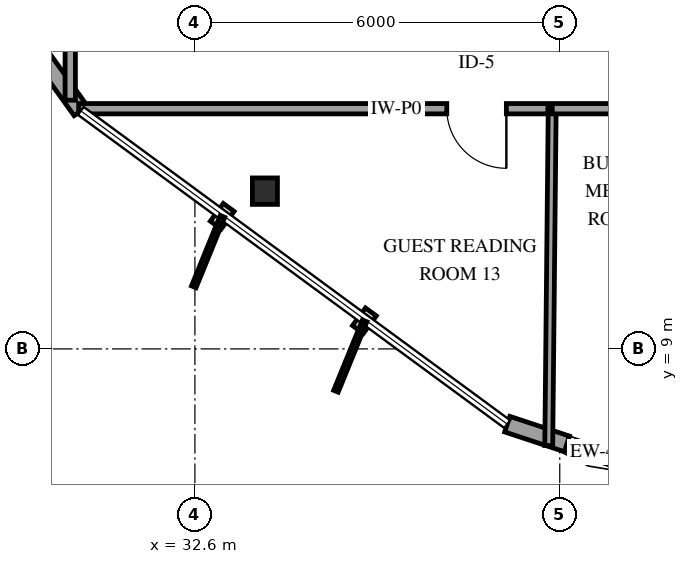
"""IFC4 building model, lengths in metres.
Left out: names, types, materials, properties, quantities, classifications, styles, units other than length and angle.
Written with IfcOpenShell. Run it as: python <this file> out.ifc"""

import sys

from ifc_helpers import new_model, si_unit, direction, frame, frame_2d, origin, origin_2d, place, context, subcontext, project, spatial, rectangle, i_section, extrude, element, fill, save


model = new_model("IFC4")
c1 = context("Model", 3, precision=1e-05, world=origin(), true_north=direction((0.0, 1.0)))
c2 = subcontext(c1, "Body", "Model", "MODEL_VIEW")
j1 = project(units=[si_unit("LENGTHUNIT", "METRE"), si_unit("PLANEANGLEUNIT", "RADIAN")], contexts=[c1])
p1 = place(None, origin())
s1 = spatial("IfcSite", under=j1, at=p1, CompositionType="ELEMENT")
p2 = place(p1, origin())
s2 = spatial("IfcBuilding", under=s1, at=p2, CompositionType="ELEMENT")
p3 = place(p2, frame((0.0, 0.0, 164.2)))
s3 = spatial("IfcBuildingStorey", under=s2, at=p3, CompositionType="ELEMENT", Elevation=164.2)
p4 = place(p3, frame((33.751, 11.594, 0.0), z_axis=(0.0, 0.0, 1.0), x_axis=(1.0, 0.0, 0.0)))
e1 = element("IfcColumn", 1, at=p4, inside=s3, PredefinedType="COLUMN", context=c2, shape_type="SweptSolid", body=[
    extrude(i_section(OverallWidth=0.412, OverallDepth=0.435, WebThickness=0.036, FlangeThickness=0.057, FilletRadius=0.038, at=origin_2d()), origin(), (0.0, 0.0, 1.0), 3.6),
])
p5 = place(p3, frame((28.992, 15.323, 0.0), z_axis=(0.0, 0.0, 1.0), x_axis=(0.583586868665, -0.812050716841, 0.0)))
e2 = element("IfcWall", 2, at=p5, inside=s3, PredefinedType="SOLIDWALL", context=c2, shape_type="SweptSolid", body=[
    extrude(rectangle(XDim=2.967, YDim=0.27, at=frame_2d((1.483, 0.0))), origin(), (0.0, 0.0, 1.0), 2.679),
])
p6 = place(p3, frame((37.737, 7.762, 0.0), z_axis=(0.0, 0.0, 1.0), x_axis=(0.949413160374, -0.314029697494, 0.0)))
e3 = element("IfcWall", 3, at=p6, inside=s3, PredefinedType="SOLIDWALL", context=c2, shape_type="SweptSolid", body=[
    extrude(rectangle(XDim=2.967, YDim=0.27, at=frame_2d((1.483, 0.0))), origin(), (0.0, 0.0, 1.0), 2.679),
])
p7 = place(p6, frame((1.033, 0.0, 0.75)))
e4 = element("IfcOpeningElement", 4, at=p7, cuts=e3, PredefinedType="OPENING", context=c2, shape_type="SweptSolid", body=[
    extrude(rectangle(XDim=0.9, YDim=1.5, at=frame_2d((0.45, 0.75))), frame((0.0, 0.145, 0.0), z_axis=(0.0, -1.0, 0.0), x_axis=(1.0, 0.0, 0.0)), (0.0, 0.0, 1.0), 0.29),
])
p8 = place(p3, frame((30.55, 13.09, 0.0), z_axis=(0.0, 0.0, 1.0), x_axis=(0.0, 1.0, 0.0)))
e5 = element("IfcWall", 5, at=p8, inside=s3, PredefinedType="PARTITIONING", context=c2, shape_type="SweptSolid", body=[
    extrude(rectangle(XDim=8.688, YDim=0.17, at=frame_2d((4.344, 0.0))), origin(), (0.0, 0.0, 1.0), 3.3),
])
p9 = place(p8, frame((3.869, 0.0, 0.0)))
e6 = element("IfcOpeningElement", 6, at=p9, cuts=e5, PredefinedType="OPENING", context=c2, shape_type="SweptSolid", body=[
    extrude(rectangle(XDim=0.98, YDim=2.15, at=frame_2d((0.49, 1.075))), frame((0.0, 0.095, 0.0), z_axis=(0.0, -1.0, 0.0), x_axis=(1.0, 0.0, 0.0)), (0.0, 0.0, 1.0), 0.19),
])
p10 = place(p3, frame((38.405, 12.95, 0.0), z_axis=(0.0, 0.0, 1.0), x_axis=(-1.0, 0.0, 0.0)))
e7 = element("IfcWall", 7, at=p10, inside=s3, PredefinedType="PARTITIONING", context=c2, shape_type="SweptSolid", body=[
    extrude(rectangle(XDim=7.717, YDim=0.17, at=frame_2d((3.858, 0.0))), origin(), (0.0, 0.0, 1.0), 3.3),
])
p11 = place(p10, frame((0.683, 0.0, 0.0)))
e8 = element("IfcOpeningElement", 8, at=p11, cuts=e7, PredefinedType="OPENING", context=c2, shape_type="SweptSolid", body=[
    extrude(rectangle(XDim=0.98, YDim=2.15, at=frame_2d((0.49, 1.075))), frame((0.0, 0.095, 0.0), z_axis=(0.0, -1.0, 0.0), x_axis=(1.0, 0.0, 0.0)), (0.0, 0.0, 1.0), 0.19),
])
p12 = place(p3, frame((38.475, 12.879, 0.0), z_axis=(0.0, 0.0, 1.0), x_axis=(-0.010266857628, -0.999947294428, 0.0)))
e9 = element("IfcWall", 9, at=p12, inside=s3, PredefinedType="PARTITIONING", context=c2, shape_type="SweptSolid", body=[
    extrude(rectangle(XDim=5.469, YDim=0.13, at=frame_2d((2.735, 0.0))), origin(), (0.0, 0.0, 1.0), 2.678),
])
p13 = place(p3, frame((41.13, 12.95, 0.0), z_axis=(0.0, 0.0, 1.0), x_axis=(-1.0, 0.0, 0.0)))
e10 = element("IfcWall", 10, at=p13, inside=s3, PredefinedType="PARTITIONING", context=c2, shape_type="SweptSolid", body=[
    extrude(rectangle(XDim=2.654, YDim=0.17, at=frame_2d((1.327, 0.0))), origin(), (0.0, 0.0, 1.0), 3.3),
])
p14 = place(p7, origin())
e11 = element("IfcWindow", 11, at=p14, inside=s3, PartitioningType="SINGLE_PANEL", PredefinedType="WINDOW", context=c2, shape_type="SweptSolid", body=[
    extrude(rectangle(XDim=0.9, YDim=1.5, at=frame_2d((0.45, 0.75))), frame((0.0, 0.03, 0.0), z_axis=(0.0, -1.0, 0.0), x_axis=(1.0, 0.0, 0.0)), (0.0, 0.0, 1.0), 0.06),
])
fill(e4, e11)
p15 = place(p11, origin())
e12 = element("IfcDoor", 12, at=p15, inside=s3, OperationType="SINGLE_SWING_LEFT", PredefinedType="DOOR", context=c2, shape_type="SweptSolid", body=[
    extrude(rectangle(XDim=0.98, YDim=2.15, at=frame_2d((0.49, 1.075))), frame((0.0, 0.025, 0.0), z_axis=(0.0, -1.0, 0.0), x_axis=(1.0, 0.0, 0.0)), (0.0, 0.0, 1.0), 0.05),
])
fill(e8, e12)
save(model, sys.argv[1])
